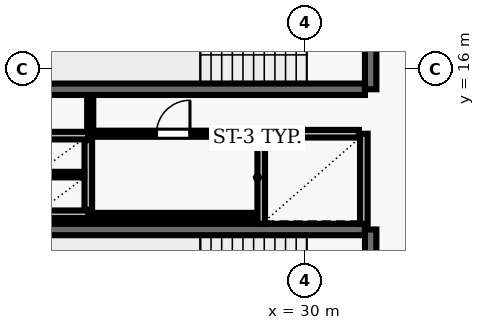
"""IFC4 building model, lengths in metres.
Left out: names, types, materials, properties, quantities, classifications, styles, units other than length and angle.
Written with IfcOpenShell. Run it as: python <this file> out.ifc"""

import sys

from ifc_helpers import new_model, si_unit, direction, frame, frame_2d, origin, place, context, subcontext, project, spatial, rectangle, extrude, element, fill, save


model = new_model("IFC4")
c1 = context("Model", 3, precision=1e-05, world=origin(), true_north=direction((0.0, 1.0)))
c2 = subcontext(c1, "Body", "Model", "MODEL_VIEW")
j1 = project(units=[si_unit("LENGTHUNIT", "METRE"), si_unit("PLANEANGLEUNIT", "RADIAN")], contexts=[c1])
p1 = place(None, origin())
s1 = spatial("IfcSite", under=j1, at=p1, CompositionType="ELEMENT")
p2 = place(p1, origin())
s2 = spatial("IfcBuilding", under=s1, at=p2, CompositionType="ELEMENT")
p3 = place(p2, frame((0.0, 0.0, 158.0)))
s3 = spatial("IfcBuildingStorey", under=s2, at=p3, CompositionType="ELEMENT", Elevation=158.0)
p4 = place(p3, frame((23.22, 15.47, 0.0), z_axis=(0.0, 0.0, 1.0), x_axis=(1.0, 0.0, 0.0)))
e1 = element("IfcWall", 1, at=p4, inside=s3, PredefinedType="SHEAR", context=c2, shape_type="SweptSolid", body=[
    extrude(rectangle(XDim=8.36, YDim=0.3, at=frame_2d((4.18, 0.0))), origin(), (0.0, 0.0, 1.0), 3.69),
])
p5 = place(p3, frame((31.73, 15.47, 0.0), z_axis=(0.0, 0.0, 1.0), x_axis=(0.0, 1.0, 0.0)))
e2 = element("IfcWall", 2, at=p5, inside=s3, PredefinedType="SHEAR", context=c2, shape_type="SweptSolid", body=[
    extrude(rectangle(XDim=3.51, YDim=0.3, at=frame_2d((1.755, 0.0))), origin(), (0.0, 0.0, 1.0), 3.69),
])
p6 = place(p5, frame((1.18, 0.0, 0.0)))
e3 = element("IfcOpeningElement", 3, at=p6, cuts=e2, PredefinedType="OPENING", context=c2, shape_type="SweptSolid", body=[
    extrude(rectangle(XDim=1.15, YDim=2.15, at=frame_2d((0.575, 1.075))), frame((0.0, 0.16, 0.0), z_axis=(0.0, -1.0, 0.0), x_axis=(1.0, 0.0, 0.0)), (0.0, 0.0, 1.0), 0.32),
])
p7 = place(p3, frame((31.58, 11.78, 0.0), z_axis=(0.0, 0.0, 1.0), x_axis=(-1.0, 0.0, 0.0)))
e4 = element("IfcWall", 4, at=p7, inside=s3, PredefinedType="SHEAR", context=c2, shape_type="SweptSolid", body=[
    extrude(rectangle(XDim=8.36, YDim=0.3, at=frame_2d((4.18, 0.0))), origin(), (0.0, 0.0, 1.0), 3.69),
])
p8 = place(p3, frame((31.73, 8.27, 0.0), z_axis=(0.0, 0.0, 1.0), x_axis=(0.0, 1.0, 0.0)))
e5 = element("IfcWall", 5, at=p8, inside=s3, PredefinedType="SHEAR", context=c2, shape_type="SweptSolid", body=[
    extrude(rectangle(XDim=3.51, YDim=0.3, at=frame_2d((1.755, 0.0))), origin(), (0.0, 0.0, 1.0), 3.69),
])
p9 = place(p8, frame((1.18, 0.0, 0.0)))
e6 = element("IfcOpeningElement", 6, at=p9, cuts=e5, PredefinedType="OPENING", context=c2, shape_type="SweptSolid", body=[
    extrude(rectangle(XDim=1.15, YDim=2.15, at=frame_2d((0.575, 1.075))), frame((0.0, 0.16, 0.0), z_axis=(0.0, -1.0, 0.0), x_axis=(1.0, 0.0, 0.0)), (0.0, 0.0, 1.0), 0.32),
])
for number, where, z_axis, x_axis in (
    (7, (28.85, 14.3, 0.0), (0.0, 0.0, 1.0), (0.0, -1.0, 0.0)),
    (8, (31.55, 11.93, 0.0), (0.0, 0.0, 1.0), (0.0, 1.0, 0.0)),
):
    element("IfcWall", number, at=place(p3, frame(where, z_axis=z_axis, x_axis=x_axis)), inside=s3, PredefinedType="SOLIDWALL", context=c2, shape_type="SweptSolid", body=[
        extrude(rectangle(XDim=2.37, YDim=0.2, at=frame_2d((1.185, 0.0))), origin(), (0.0, 0.0, 1.0), 3.69),
    ])
p10 = place(p3, frame((31.42, 14.3, 0.0), z_axis=(0.0, 0.0, 1.0), x_axis=(-1.0, 0.0, 0.0)))
e9 = element("IfcWall", 9, at=p10, inside=s3, PredefinedType="SOLIDWALL", context=c2, shape_type="SweptSolid", body=[
    extrude(rectangle(XDim=2.44, YDim=0.2, at=frame_2d((1.22, 0.0))), origin(), (0.0, 0.0, 1.0), 3.69),
])
for number, where, z_axis, x_axis in (
    (10, (22.9, 14.25, 0.0), (0.0, 0.0, 1.0), (1.0, 0.0, 0.0)),
    (11, (22.9, 12.18, 0.0), (0.0, 0.0, 1.0), (1.0, 0.0, 0.0)),
):
    element("IfcWall", number, at=place(p3, frame(where, z_axis=z_axis, x_axis=x_axis)), inside=s3, PredefinedType="SOLIDWALL", context=c2, shape_type="SweptSolid", body=[
        extrude(rectangle(XDim=1.4, YDim=0.2, at=frame_2d((0.7, 0.0))), origin(), (0.0, 0.0, 1.0), 3.69),
    ])
p11 = place(p3, frame((24.3, 12.3, 0.0), z_axis=(0.0, 0.0, 1.0), x_axis=(0.0, 1.0, 0.0)))
e12 = element("IfcWall", 12, at=p11, inside=s3, PredefinedType="SOLIDWALL", context=c2, shape_type="SweptSolid", body=[
    extrude(rectangle(XDim=1.83, YDim=0.2, at=frame_2d((0.915, 0.0))), origin(), (0.0, 0.0, 1.0), 3.69),
])
p12 = place(p3, frame((23.01, 13.225, 0.0), z_axis=(0.0, 0.0, 1.0), x_axis=(1.0, 0.0, 0.0)))
e13 = element("IfcWall", 13, at=p12, inside=s3, PredefinedType="PARTITIONING", context=c2, shape_type="SweptSolid", body=[
    extrude(rectangle(XDim=1.18, YDim=0.145, at=frame_2d((0.59, 0.0))), origin(), (0.0, 0.0, 1.0), 3.69),
])
p13 = place(p3, frame((24.35, 12.15, 0.0), z_axis=(0.0, 0.0, 1.0), x_axis=(1.0, 0.0, 0.0)))
e14 = element("IfcWall", 14, at=p13, inside=s3, PredefinedType="PARTITIONING", context=c2, shape_type="SweptSolid", body=[
    extrude(rectangle(XDim=4.37, YDim=0.135, at=frame_2d((2.185, 0.0))), origin(), (0.0, 0.0, 1.0), 3.69),
])
p14 = place(p3, frame((24.35, 14.3, 0.0), z_axis=(0.0, 0.0, 1.0), x_axis=(1.0, 0.0, 0.0)))
e15 = element("IfcWall", 15, at=p14, inside=s3, PredefinedType="PARTITIONING", context=c2, shape_type="SweptSolid", body=[
    extrude(rectangle(XDim=4.37, YDim=0.16, at=frame_2d((2.185, 0.0))), origin(), (0.0, 0.0, 1.0), 3.69),
])
p15 = place(p14, frame((1.745, 0.0, 0.0)))
e16 = element("IfcOpeningElement", 16, at=p15, cuts=e15, PredefinedType="OPENING", context=c2, shape_type="SweptSolid", body=[
    extrude(rectangle(XDim=0.88, YDim=2.1, at=frame_2d((0.44, 1.05))), frame((0.0, 0.09, 0.0), z_axis=(0.0, -1.0, 0.0), x_axis=(1.0, 0.0, 0.0)), (0.0, 0.0, 1.0), 0.18),
])
p16 = place(p3, frame((24.35, 15.29, 0.0), z_axis=(0.0, 0.0, 1.0), x_axis=(0.0, -1.0, 0.0)))
e17 = element("IfcWall", 17, at=p16, inside=s3, PredefinedType="PARTITIONING", context=c2, shape_type="SweptSolid", body=[
    extrude(rectangle(XDim=0.915, YDim=0.16, at=frame_2d((0.458, 0.0))), origin(), (0.0, 0.0, 1.0), 3.69),
])
p17 = place(p15, origin())
e18 = element("IfcDoor", 18, at=p17, inside=s3, OperationType="SINGLE_SWING_RIGHT", PredefinedType="DOOR", context=c2, shape_type="SweptSolid", body=[
    extrude(rectangle(XDim=0.88, YDim=2.1, at=frame_2d((0.44, 1.05))), frame((0.0, 0.025, 0.0), z_axis=(0.0, -1.0, 0.0), x_axis=(1.0, 0.0, 0.0)), (0.0, 0.0, 1.0), 0.05),
])
fill(e16, e18)
save(model, sys.argv[1])
